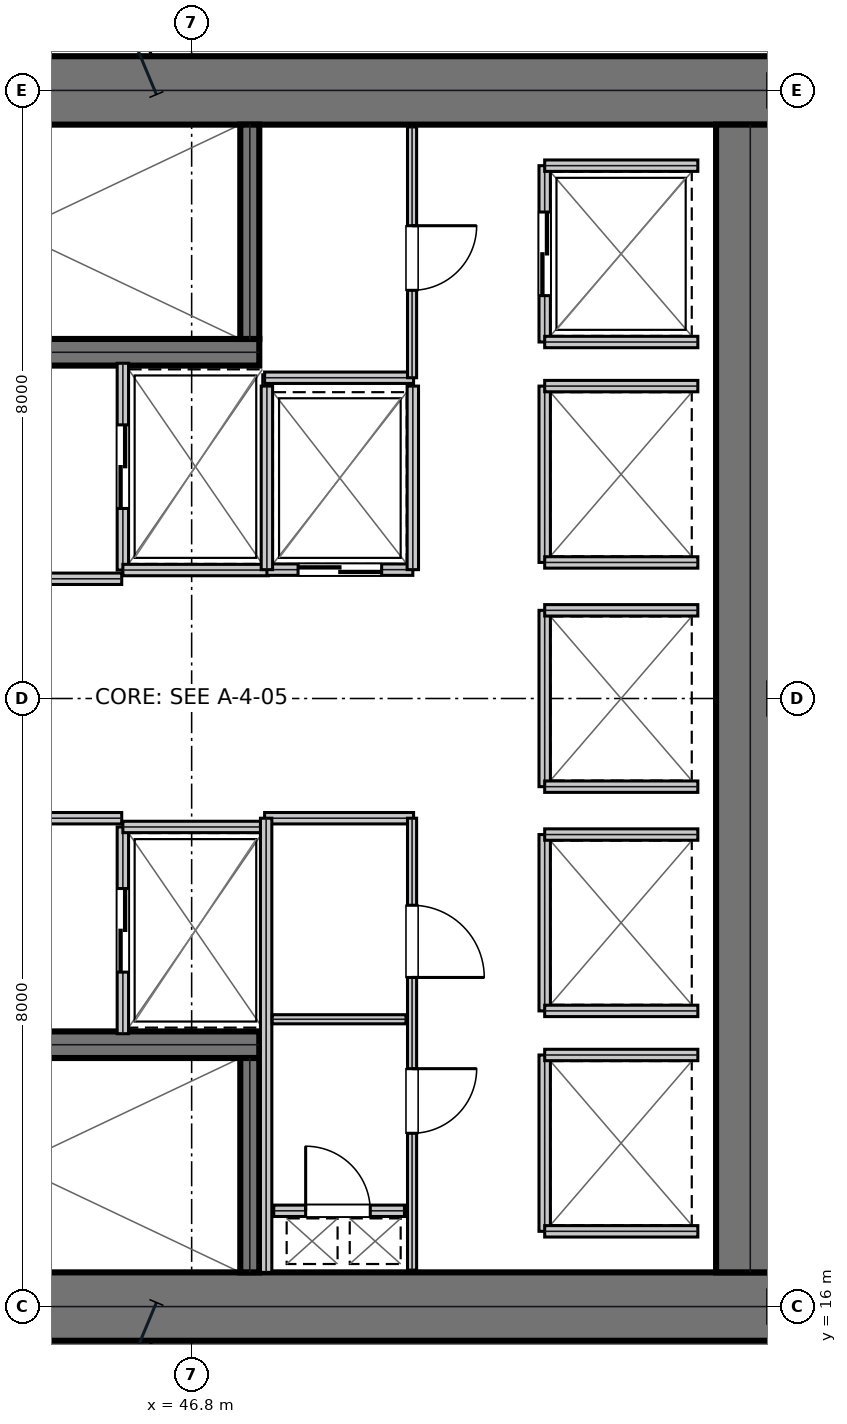
"""IFC4 building model, lengths in metres.
Left out: names, types, materials, properties, quantities, classifications, styles, units other than length and angle.
Written with IfcOpenShell. Run it as: python <this file> out.ifc"""

import sys

from ifc_helpers import new_model, si_unit, direction, frame, frame_2d, origin, place, context, subcontext, project, spatial, rectangle, extrude, element, fill, save


model = new_model("IFC4")
c1 = context("Model", 3, precision=1e-05, world=origin(), true_north=direction((0.0, 1.0)))
c2 = subcontext(c1, "Body", "Model", "MODEL_VIEW")
j1 = project(units=[si_unit("LENGTHUNIT", "METRE"), si_unit("PLANEANGLEUNIT", "RADIAN")], contexts=[c1])
p1 = place(None, origin())
s1 = spatial("IfcSite", under=j1, at=p1, CompositionType="ELEMENT")
p2 = place(p1, origin())
s2 = spatial("IfcBuilding", under=s1, at=p2, CompositionType="ELEMENT")
p3 = place(p2, frame((0.0, 0.0, 74.25)))
s3 = spatial("IfcBuildingStorey", under=s2, at=p3, CompositionType="ELEMENT", Elevation=74.25)
for number, where, z_axis, x_axis in (
    (1, (38.8, 32.0, 0.0), (0.0, 0.0, 1.0), (1.0, 0.0, 0.0)),
    (2, (38.8, 16.0, 0.0), (0.0, 0.0, 1.0), (1.0, 0.0, 0.0)),
):
    element("IfcWall", number, at=place(p3, frame(where, z_axis=z_axis, x_axis=x_axis)), inside=s3, PredefinedType="SHEAR", context=c2, shape_type="SweptSolid", body=[
        extrude(rectangle(XDim=16.0, YDim=0.9, at=frame_2d((8.0, 0.0))), origin(), (0.0, 0.0, 1.0), 3.81),
    ])
p4 = place(p3, frame((54.15, 16.45, 0.0), z_axis=(0.0, 0.0, 1.0), x_axis=(0.0, 1.0, 0.0)))
e3 = element("IfcWall", 3, at=p4, inside=s3, PredefinedType="SHEAR", context=c2, shape_type="SweptSolid", body=[
    extrude(rectangle(XDim=15.1, YDim=0.9, at=frame_2d((7.55, 0.0))), origin(), (0.0, 0.0, 1.0), 3.81),
])
p5 = place(p3, frame((39.98, 28.555, 0.0), z_axis=(0.0, 0.0, 1.0), x_axis=(1.0, 0.0, 0.0)))
e4 = element("IfcWall", 4, at=p5, inside=s3, PredefinedType="SHEAR", context=c2, shape_type="SweptSolid", body=[
    extrude(rectangle(XDim=7.71, YDim=0.35, at=frame_2d((3.855, 0.0))), origin(), (0.0, 0.0, 1.0), 3.81),
])
p6 = place(p5, frame((0.25, 0.0, 0.0)))
e5 = element("IfcOpeningElement", 5, at=p6, cuts=e4, PredefinedType="OPENING", context=c2, shape_type="SweptSolid", body=[
    extrude(rectangle(XDim=1.1, YDim=2.15, at=frame_2d((0.55, 1.075))), frame((0.0, 0.185, 0.0), z_axis=(0.0, -1.0, 0.0), x_axis=(1.0, 0.0, 0.0)), (0.0, 0.0, 1.0), 0.37),
])
p7 = place(p3, frame((39.98, 19.445, 0.0), z_axis=(0.0, 0.0, 1.0), x_axis=(1.0, 0.0, 0.0)))
e6 = element("IfcWall", 6, at=p7, inside=s3, PredefinedType="SHEAR", context=c2, shape_type="SweptSolid", body=[
    extrude(rectangle(XDim=7.71, YDim=0.35, at=frame_2d((3.855, 0.0))), origin(), (0.0, 0.0, 1.0), 3.81),
])
p8 = place(p7, frame((0.25, 0.0, 0.0)))
e7 = element("IfcOpeningElement", 7, at=p8, cuts=e6, PredefinedType="OPENING", context=c2, shape_type="SweptSolid", body=[
    extrude(rectangle(XDim=1.1, YDim=2.15, at=frame_2d((0.55, 1.075))), frame((0.0, 0.185, 0.0), z_axis=(0.0, -1.0, 0.0), x_axis=(1.0, 0.0, 0.0)), (0.0, 0.0, 1.0), 0.37),
])
for number, where, z_axis, x_axis in (
    (8, (47.565, 28.73, 0.0), (0.0, 0.0, 1.0), (0.0, 1.0, 0.0)),
    (9, (47.565, 16.45, 0.0), (0.0, 0.0, 1.0), (0.0, 1.0, 0.0)),
):
    element("IfcWall", number, at=place(p3, frame(where, z_axis=z_axis, x_axis=x_axis)), inside=s3, PredefinedType="SHEAR", context=c2, shape_type="SweptSolid", body=[
        extrude(rectangle(XDim=2.82, YDim=0.25, at=frame_2d((1.41, 0.0))), origin(), (0.0, 0.0, 1.0), 3.81),
    ])
p9 = place(p3, frame((39.98, 25.575, 0.0), z_axis=(0.0, 0.0, 1.0), x_axis=(1.0, 0.0, 0.0)))
e10 = element("IfcWall", 10, at=p9, inside=s3, PredefinedType="PARTITIONING", context=c2, shape_type="SweptSolid", body=[
    extrude(rectangle(XDim=5.9, YDim=0.15, at=frame_2d((2.95, 0.0))), origin(), (0.0, 0.0, 1.0), 3.81),
])
p10 = place(p9, frame((2.35, 0.0, 0.0)))
e11 = element("IfcOpeningElement", 11, at=p10, cuts=e10, PredefinedType="OPENING", context=c2, shape_type="SweptSolid", body=[
    extrude(rectangle(XDim=1.05, YDim=2.15, at=frame_2d((0.525, 1.075))), frame((0.0, 0.085, 0.0), z_axis=(0.0, -1.0, 0.0), x_axis=(1.0, 0.0, 0.0)), (0.0, 0.0, 1.0), 0.17),
])
p11 = place(p3, frame((39.98, 22.425, 0.0), z_axis=(0.0, 0.0, 1.0), x_axis=(1.0, 0.0, 0.0)))
e12 = element("IfcWall", 12, at=p11, inside=s3, PredefinedType="PARTITIONING", context=c2, shape_type="SweptSolid", body=[
    extrude(rectangle(XDim=5.9, YDim=0.15, at=frame_2d((2.95, 0.0))), origin(), (0.0, 0.0, 1.0), 3.81),
])
p12 = place(p11, frame((2.35, 0.0, 0.0)))
e13 = element("IfcOpeningElement", 13, at=p12, cuts=e12, PredefinedType="OPENING", context=c2, shape_type="SweptSolid", body=[
    extrude(rectangle(XDim=1.05, YDim=2.15, at=frame_2d((0.525, 1.075))), frame((0.0, 0.085, 0.0), z_axis=(0.0, -1.0, 0.0), x_axis=(1.0, 0.0, 0.0)), (0.0, 0.0, 1.0), 0.17),
])
p13 = place(p3, frame((45.895, 25.69, 0.0), z_axis=(0.0, 0.0, 1.0), x_axis=(0.0, 1.0, 0.0)))
e14 = element("IfcWall", 14, at=p13, inside=s3, PredefinedType="PARTITIONING", context=c2, shape_type="SweptSolid", body=[
    extrude(rectangle(XDim=2.72, YDim=0.15, at=frame_2d((1.36, 0.0))), origin(), (0.0, 0.0, 1.0), 3.81),
])
p14 = place(p13, frame((0.81, 0.0, 0.0)))
e15 = element("IfcOpeningElement", 15, at=p14, cuts=e14, PredefinedType="OPENING", context=c2, shape_type="SweptSolid", body=[
    extrude(rectangle(XDim=1.1, YDim=2.15, at=frame_2d((0.55, 1.075))), frame((0.0, 0.085, 0.0), z_axis=(0.0, -1.0, 0.0), x_axis=(1.0, 0.0, 0.0)), (0.0, 0.0, 1.0), 0.17),
])
p15 = place(p3, frame((45.895, 25.69, 0.0), z_axis=(0.0, 0.0, 1.0), x_axis=(1.0, 0.0, 0.0)))
e16 = element("IfcWall", 16, at=p15, inside=s3, PredefinedType="PARTITIONING", context=c2, shape_type="SweptSolid", body=[
    extrude(rectangle(XDim=1.915, YDim=0.15, at=frame_2d((0.958, 0.0))), origin(), (0.0, 0.0, 1.0), 3.81),
])
p16 = place(p3, frame((45.895, 19.59, 0.0), z_axis=(0.0, 0.0, 1.0), x_axis=(0.0, 1.0, 0.0)))
e17 = element("IfcWall", 17, at=p16, inside=s3, PredefinedType="PARTITIONING", context=c2, shape_type="SweptSolid", body=[
    extrude(rectangle(XDim=2.72, YDim=0.15, at=frame_2d((1.36, 0.0))), origin(), (0.0, 0.0, 1.0), 3.81),
])
p17 = place(p16, frame((0.81, 0.0, 0.0)))
e18 = element("IfcOpeningElement", 18, at=p17, cuts=e17, PredefinedType="OPENING", context=c2, shape_type="SweptSolid", body=[
    extrude(rectangle(XDim=1.1, YDim=2.15, at=frame_2d((0.55, 1.075))), frame((0.0, 0.085, 0.0), z_axis=(0.0, -1.0, 0.0), x_axis=(1.0, 0.0, 0.0)), (0.0, 0.0, 1.0), 0.17),
])
p18 = place(p3, frame((45.895, 22.31, 0.0), z_axis=(0.0, 0.0, 1.0), x_axis=(1.0, 0.0, 0.0)))
e19 = element("IfcWall", 19, at=p18, inside=s3, PredefinedType="PARTITIONING", context=c2, shape_type="SweptSolid", body=[
    extrude(rectangle(XDim=1.915, YDim=0.15, at=frame_2d((0.958, 0.0))), origin(), (0.0, 0.0, 1.0), 3.81),
])
p19 = place(p3, frame((47.79, 25.695, 0.0), z_axis=(0.0, 0.0, 1.0), x_axis=(1.0, 0.0, 0.0)))
e20 = element("IfcWall", 20, at=p19, inside=s3, PredefinedType="PARTITIONING", context=c2, shape_type="SweptSolid", body=[
    extrude(rectangle(XDim=1.92, YDim=0.15, at=frame_2d((0.96, 0.0))), origin(), (0.0, 0.0, 1.0), 3.81),
])
p20 = place(p19, frame((0.41, 0.0, 0.0)))
e21 = element("IfcOpeningElement", 21, at=p20, cuts=e20, PredefinedType="OPENING", context=c2, shape_type="SweptSolid", body=[
    extrude(rectangle(XDim=1.1, YDim=2.15, at=frame_2d((0.55, 1.075))), frame((0.0, 0.085, 0.0), z_axis=(0.0, -1.0, 0.0), x_axis=(1.0, 0.0, 0.0)), (0.0, 0.0, 1.0), 0.17),
])
for number, where, z_axis, x_axis in (
    (22, (47.79, 25.695, 0.0), (0.0, 0.0, 1.0), (0.0, 1.0, 0.0)),
    (23, (49.71, 25.695, 0.0), (0.0, 0.0, 1.0), (0.0, 1.0, 0.0)),
):
    element("IfcWall", number, at=place(p3, frame(where, z_axis=z_axis, x_axis=x_axis)), inside=s3, PredefinedType="PARTITIONING", context=c2, shape_type="SweptSolid", body=[
        extrude(rectangle(XDim=2.415, YDim=0.15, at=frame_2d((1.208, 0.0))), origin(), (0.0, 0.0, 1.0), 3.81),
    ])
p21 = place(p3, frame((51.445, 28.69, 0.0), z_axis=(0.0, 0.0, 1.0), x_axis=(0.0, 1.0, 0.0)))
e24 = element("IfcWall", 24, at=p21, inside=s3, PredefinedType="PARTITIONING", context=c2, shape_type="SweptSolid", body=[
    extrude(rectangle(XDim=2.32, YDim=0.15, at=frame_2d((1.16, 0.0))), origin(), (0.0, 0.0, 1.0), 3.81),
])
p22 = place(p21, frame((0.61, 0.0, 0.0)))
e25 = element("IfcOpeningElement", 25, at=p22, cuts=e24, PredefinedType="OPENING", context=c2, shape_type="SweptSolid", body=[
    extrude(rectangle(XDim=1.1, YDim=2.15, at=frame_2d((0.55, 1.075))), frame((0.0, 0.085, 0.0), z_axis=(0.0, -1.0, 0.0), x_axis=(1.0, 0.0, 0.0)), (0.0, 0.0, 1.0), 0.17),
])
for number, where, z_axis, x_axis in (
    (26, (51.445, 28.69, 0.0), (0.0, 0.0, 1.0), (1.0, 0.0, 0.0)),
    (27, (51.445, 31.01, 0.0), (0.0, 0.0, 1.0), (1.0, 0.0, 0.0)),
):
    element("IfcWall", number, at=place(p3, frame(where, z_axis=z_axis, x_axis=x_axis)), inside=s3, PredefinedType="PARTITIONING", context=c2, shape_type="SweptSolid", body=[
        extrude(rectangle(XDim=2.015, YDim=0.15, at=frame_2d((1.007, 0.0))), origin(), (0.0, 0.0, 1.0), 3.81),
    ])
p23 = place(p3, frame((51.445, 25.79, 0.0), z_axis=(0.0, 0.0, 1.0), x_axis=(0.0, 1.0, 0.0)))
e28 = element("IfcWall", 28, at=p23, inside=s3, PredefinedType="PARTITIONING", context=c2, shape_type="SweptSolid", body=[
    extrude(rectangle(XDim=2.32, YDim=0.15, at=frame_2d((1.16, 0.0))), origin(), (0.0, 0.0, 1.0), 3.81),
])
for number, where, z_axis, x_axis in (
    (29, (51.445, 25.79, 0.0), (0.0, 0.0, 1.0), (1.0, 0.0, 0.0)),
    (30, (51.445, 28.11, 0.0), (0.0, 0.0, 1.0), (1.0, 0.0, 0.0)),
):
    element("IfcWall", number, at=place(p3, frame(where, z_axis=z_axis, x_axis=x_axis)), inside=s3, PredefinedType="PARTITIONING", context=c2, shape_type="SweptSolid", body=[
        extrude(rectangle(XDim=2.015, YDim=0.15, at=frame_2d((1.007, 0.0))), origin(), (0.0, 0.0, 1.0), 3.81),
    ])
p24 = place(p3, frame((51.445, 19.89, 0.0), z_axis=(0.0, 0.0, 1.0), x_axis=(0.0, 1.0, 0.0)))
e31 = element("IfcWall", 31, at=p24, inside=s3, PredefinedType="PARTITIONING", context=c2, shape_type="SweptSolid", body=[
    extrude(rectangle(XDim=2.32, YDim=0.15, at=frame_2d((1.16, 0.0))), origin(), (0.0, 0.0, 1.0), 3.81),
])
for number, where, z_axis, x_axis in (
    (32, (51.445, 19.89, 0.0), (0.0, 0.0, 1.0), (1.0, 0.0, 0.0)),
    (33, (51.445, 22.21, 0.0), (0.0, 0.0, 1.0), (1.0, 0.0, 0.0)),
):
    element("IfcWall", number, at=place(p3, frame(where, z_axis=z_axis, x_axis=x_axis)), inside=s3, PredefinedType="PARTITIONING", context=c2, shape_type="SweptSolid", body=[
        extrude(rectangle(XDim=2.015, YDim=0.15, at=frame_2d((1.007, 0.0))), origin(), (0.0, 0.0, 1.0), 3.81),
    ])
p25 = place(p3, frame((51.445, 22.84, 0.0), z_axis=(0.0, 0.0, 1.0), x_axis=(0.0, 1.0, 0.0)))
e34 = element("IfcWall", 34, at=p25, inside=s3, PredefinedType="PARTITIONING", context=c2, shape_type="SweptSolid", body=[
    extrude(rectangle(XDim=2.32, YDim=0.15, at=frame_2d((1.16, 0.0))), origin(), (0.0, 0.0, 1.0), 3.81),
])
for number, where, z_axis, x_axis in (
    (35, (51.445, 22.84, 0.0), (0.0, 0.0, 1.0), (1.0, 0.0, 0.0)),
    (36, (51.445, 25.16, 0.0), (0.0, 0.0, 1.0), (1.0, 0.0, 0.0)),
):
    element("IfcWall", number, at=place(p3, frame(where, z_axis=z_axis, x_axis=x_axis)), inside=s3, PredefinedType="PARTITIONING", context=c2, shape_type="SweptSolid", body=[
        extrude(rectangle(XDim=2.015, YDim=0.15, at=frame_2d((1.007, 0.0))), origin(), (0.0, 0.0, 1.0), 3.81),
    ])
p26 = place(p3, frame((51.445, 16.99, 0.0), z_axis=(0.0, 0.0, 1.0), x_axis=(0.0, 1.0, 0.0)))
e37 = element("IfcWall", 37, at=p26, inside=s3, PredefinedType="PARTITIONING", context=c2, shape_type="SweptSolid", body=[
    extrude(rectangle(XDim=2.32, YDim=0.15, at=frame_2d((1.16, 0.0))), origin(), (0.0, 0.0, 1.0), 3.81),
])
for number, where, z_axis, x_axis in (
    (38, (51.445, 16.99, 0.0), (0.0, 0.0, 1.0), (1.0, 0.0, 0.0)),
    (39, (51.445, 19.31, 0.0), (0.0, 0.0, 1.0), (1.0, 0.0, 0.0)),
):
    element("IfcWall", number, at=place(p3, frame(where, z_axis=z_axis, x_axis=x_axis)), inside=s3, PredefinedType="PARTITIONING", context=c2, shape_type="SweptSolid", body=[
        extrude(rectangle(XDim=2.015, YDim=0.15, at=frame_2d((1.007, 0.0))), origin(), (0.0, 0.0, 1.0), 3.81),
    ])
p27 = place(p3, frame((47.88, 17.26, 0.0), z_axis=(0.0, 0.0, 1.0), x_axis=(1.0, 0.0, 0.0)))
e40 = element("IfcWall", 40, at=p27, inside=s3, PredefinedType="PARTITIONING", context=c2, shape_type="SweptSolid", body=[
    extrude(rectangle(XDim=1.72, YDim=0.15, at=frame_2d((0.86, 0.0))), origin(), (0.0, 0.0, 1.0), 3.81),
])
p28 = place(p27, frame((0.42, 0.0, 0.0)))
e41 = element("IfcOpeningElement", 41, at=p28, cuts=e40, PredefinedType="OPENING", context=c2, shape_type="SweptSolid", body=[
    extrude(rectangle(XDim=0.85, YDim=2.15, at=frame_2d((0.425, 1.075))), frame((0.0, 0.085, 0.0), z_axis=(0.0, -1.0, 0.0), x_axis=(1.0, 0.0, 0.0)), (0.0, 0.0, 1.0), 0.17),
])
p29 = place(p3, frame((47.76, 22.425, 0.0), z_axis=(0.0, 0.0, 1.0), x_axis=(1.0, 0.0, 0.0)))
e42 = element("IfcWall", 42, at=p29, inside=s3, PredefinedType="PARTITIONING", context=c2, shape_type="SweptSolid", body=[
    extrude(rectangle(XDim=1.96, YDim=0.15, at=frame_2d((0.98, 0.0))), origin(), (0.0, 0.0, 1.0), 3.81),
])
p30 = place(p3, frame((47.78, 16.45, 0.0), z_axis=(0.0, 0.0, 1.0), x_axis=(0.0, 1.0, 0.0)))
e43 = element("IfcWall", 43, at=p30, inside=s3, PredefinedType="PARTITIONING", context=c2, shape_type="SweptSolid", body=[
    extrude(rectangle(XDim=5.975, YDim=0.15, at=frame_2d((2.988, 0.0))), origin(), (0.0, 0.0, 1.0), 3.81),
])
p31 = place(p3, frame((47.86, 19.78, 0.0), z_axis=(0.0, 0.0, 1.0), x_axis=(1.0, 0.0, 0.0)))
e44 = element("IfcWall", 44, at=p31, inside=s3, PredefinedType="PARTITIONING", context=c2, shape_type="SweptSolid", body=[
    extrude(rectangle(XDim=1.76, YDim=0.12, at=frame_2d((0.88, 0.0))), origin(), (0.0, 0.0, 1.0), 3.81),
])
p32 = place(p3, frame((49.7, 16.48, 0.0), z_axis=(0.0, 0.0, 1.0), x_axis=(0.0, 1.0, 0.0)))
e45 = element("IfcWall", 45, at=p32, inside=s3, PredefinedType="PARTITIONING", context=c2, shape_type="SweptSolid", body=[
    extrude(rectangle(XDim=5.945, YDim=0.12, at=frame_2d((2.973, 0.0))), origin(), (0.0, 0.0, 1.0), 3.81),
])
p33 = place(p32, frame((1.8, 0.0, 0.0)))
e46 = element("IfcOpeningElement", 46, at=p33, cuts=e45, PredefinedType="OPENING", context=c2, shape_type="SweptSolid", body=[
    extrude(rectangle(XDim=0.85, YDim=2.15, at=frame_2d((0.425, 1.075))), frame((0.0, 0.07, 0.0), z_axis=(0.0, -1.0, 0.0), x_axis=(1.0, 0.0, 0.0)), (0.0, 0.0, 1.0), 0.14),
])
p34 = place(p32, frame((3.85, 0.0, 0.0)))
e47 = element("IfcOpeningElement", 47, at=p34, cuts=e45, PredefinedType="OPENING", context=c2, shape_type="SweptSolid", body=[
    extrude(rectangle(XDim=0.95, YDim=2.15, at=frame_2d((0.475, 1.075))), frame((0.0, 0.07, 0.0), z_axis=(0.0, -1.0, 0.0), x_axis=(1.0, 0.0, 0.0)), (0.0, 0.0, 1.0), 0.14),
])
p35 = place(p3, frame((47.76, 28.22, 0.0), z_axis=(0.0, 0.0, 1.0), x_axis=(1.0, 0.0, 0.0)))
e48 = element("IfcWall", 48, at=p35, inside=s3, PredefinedType="PARTITIONING", context=c2, shape_type="SweptSolid", body=[
    extrude(rectangle(XDim=1.96, YDim=0.15, at=frame_2d((0.98, 0.0))), origin(), (0.0, 0.0, 1.0), 3.81),
])
p36 = place(p3, frame((49.7, 28.22, 0.0), z_axis=(0.0, 0.0, 1.0), x_axis=(0.0, 1.0, 0.0)))
e49 = element("IfcWall", 49, at=p36, inside=s3, PredefinedType="PARTITIONING", context=c2, shape_type="SweptSolid", body=[
    extrude(rectangle(XDim=3.3, YDim=0.12, at=frame_2d((1.65, 0.0))), origin(), (0.0, 0.0, 1.0), 3.81),
])
p37 = place(p36, frame((1.15, 0.0, 0.0)))
e50 = element("IfcOpeningElement", 50, at=p37, cuts=e49, PredefinedType="OPENING", context=c2, shape_type="SweptSolid", body=[
    extrude(rectangle(XDim=0.85, YDim=2.15, at=frame_2d((0.425, 1.075))), frame((0.0, 0.07, 0.0), z_axis=(0.0, -1.0, 0.0), x_axis=(1.0, 0.0, 0.0)), (0.0, 0.0, 1.0), 0.14),
])
p38 = place(p14, frame((1.1, 0.0, 0.0), z_axis=(0.0, 0.0, 1.0), x_axis=(-1.0, 0.0, 0.0)))
e51 = element("IfcDoor", 51, at=p38, inside=s3, OperationType="DOUBLE_DOOR_SLIDING", PredefinedType="DOOR", context=c2, shape_type="SweptSolid", body=[
    extrude(rectangle(XDim=1.1, YDim=2.15, at=frame_2d((0.55, 1.075))), frame((0.0, 0.025, 0.0), z_axis=(0.0, -1.0, 0.0), x_axis=(1.0, 0.0, 0.0)), (0.0, 0.0, 1.0), 0.05),
])
fill(e15, e51)
p39 = place(p17, frame((1.1, 0.0, 0.0), z_axis=(0.0, 0.0, 1.0), x_axis=(-1.0, 0.0, 0.0)))
e52 = element("IfcDoor", 52, at=p39, inside=s3, OperationType="DOUBLE_DOOR_SLIDING", PredefinedType="DOOR", context=c2, shape_type="SweptSolid", body=[
    extrude(rectangle(XDim=1.1, YDim=2.15, at=frame_2d((0.55, 1.075))), frame((0.0, 0.025, 0.0), z_axis=(0.0, -1.0, 0.0), x_axis=(1.0, 0.0, 0.0)), (0.0, 0.0, 1.0), 0.05),
])
fill(e18, e52)
p40 = place(p20, frame((1.1, 0.0, 0.0), z_axis=(0.0, 0.0, 1.0), x_axis=(-1.0, 0.0, 0.0)))
e53 = element("IfcDoor", 53, at=p40, inside=s3, OperationType="DOUBLE_DOOR_SLIDING", PredefinedType="DOOR", context=c2, shape_type="SweptSolid", body=[
    extrude(rectangle(XDim=1.1, YDim=2.15, at=frame_2d((0.55, 1.075))), frame((0.0, 0.025, 0.0), z_axis=(0.0, -1.0, 0.0), x_axis=(1.0, 0.0, 0.0)), (0.0, 0.0, 1.0), 0.05),
])
fill(e21, e53)
p41 = place(p22, frame((1.1, 0.0, 0.0), z_axis=(0.0, 0.0, 1.0), x_axis=(-1.0, 0.0, 0.0)))
e54 = element("IfcDoor", 54, at=p41, inside=s3, OperationType="DOUBLE_DOOR_SLIDING", PredefinedType="DOOR", context=c2, shape_type="SweptSolid", body=[
    extrude(rectangle(XDim=1.1, YDim=2.15, at=frame_2d((0.55, 1.075))), frame((0.0, 0.025, 0.0), z_axis=(0.0, -1.0, 0.0), x_axis=(1.0, 0.0, 0.0)), (0.0, 0.0, 1.0), 0.05),
])
fill(e25, e54)
p42 = place(p28, origin())
e55 = element("IfcDoor", 55, at=p42, inside=s3, OperationType="SINGLE_SWING_LEFT", PredefinedType="TRAPDOOR", context=c2, shape_type="SweptSolid", body=[
    extrude(rectangle(XDim=0.85, YDim=2.15, at=frame_2d((0.425, 1.075))), frame((0.0, 0.025, 0.0), z_axis=(0.0, -1.0, 0.0), x_axis=(1.0, 0.0, 0.0)), (0.0, 0.0, 1.0), 0.05),
])
fill(e41, e55)
p43 = place(p33, frame((0.85, 0.0, 0.0), z_axis=(0.0, 0.0, 1.0), x_axis=(-1.0, 0.0, 0.0)))
e56 = element("IfcDoor", 56, at=p43, inside=s3, OperationType="SINGLE_SWING_LEFT", PredefinedType="DOOR", context=c2, shape_type="SweptSolid", body=[
    extrude(rectangle(XDim=0.85, YDim=2.15, at=frame_2d((0.425, 1.075))), frame((0.0, 0.025, 0.0), z_axis=(0.0, -1.0, 0.0), x_axis=(1.0, 0.0, 0.0)), (0.0, 0.0, 1.0), 0.05),
])
fill(e46, e56)
p44 = place(p34, frame((0.95, 0.0, 0.0), z_axis=(0.0, 0.0, 1.0), x_axis=(-1.0, 0.0, 0.0)))
e57 = element("IfcDoor", 57, at=p44, inside=s3, OperationType="SINGLE_SWING_RIGHT", PredefinedType="DOOR", context=c2, shape_type="SweptSolid", body=[
    extrude(rectangle(XDim=0.95, YDim=2.15, at=frame_2d((0.475, 1.075))), frame((0.0, 0.025, 0.0), z_axis=(0.0, -1.0, 0.0), x_axis=(1.0, 0.0, 0.0)), (0.0, 0.0, 1.0), 0.05),
])
fill(e47, e57)
p45 = place(p37, frame((0.85, 0.0, 0.0), z_axis=(0.0, 0.0, 1.0), x_axis=(-1.0, 0.0, 0.0)))
e58 = element("IfcDoor", 58, at=p45, inside=s3, OperationType="SINGLE_SWING_LEFT", PredefinedType="DOOR", context=c2, shape_type="SweptSolid", body=[
    extrude(rectangle(XDim=0.85, YDim=2.15, at=frame_2d((0.425, 1.075))), frame((0.0, 0.025, 0.0), z_axis=(0.0, -1.0, 0.0), x_axis=(1.0, 0.0, 0.0)), (0.0, 0.0, 1.0), 0.05),
])
fill(e50, e58)
save(model, sys.argv[1])
